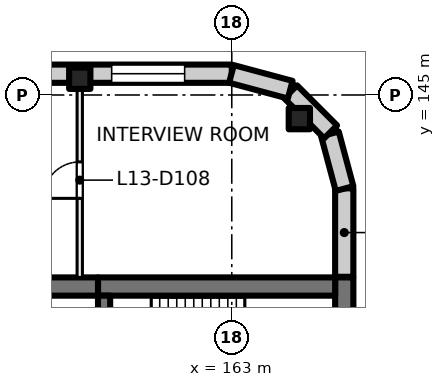
"""IFC4 building model, lengths in metres.
Left out: names, types, materials, properties, quantities, classifications, styles, units other than length and angle.
Written with IfcOpenShell. Run it as: python <this file> out.ifc"""

import sys

from ifc_helpers import new_model, si_unit, direction, frame, frame_2d, origin, origin_2d, place, context, subcontext, project, spatial, rectangle, extrude, element, fill, save


model = new_model("IFC4")
c1 = context("Model", 3, precision=1e-05, world=origin(), true_north=direction((0.0, 1.0)))
c2 = subcontext(c1, "Body", "Model", "MODEL_VIEW")
j1 = project(units=[si_unit("LENGTHUNIT", "METRE"), si_unit("PLANEANGLEUNIT", "RADIAN")], contexts=[c1])
p1 = place(None, origin())
s1 = spatial("IfcSite", under=j1, at=p1, CompositionType="ELEMENT")
p2 = place(p1, origin())
s2 = spatial("IfcBuilding", under=s1, at=p2, CompositionType="ELEMENT")
p3 = place(p2, frame((0.0, 0.0, 59.5)))
s3 = spatial("IfcBuildingStorey", under=s2, at=p3, CompositionType="ELEMENT", Elevation=59.5)
for number, where, z_axis, x_axis in (
    (1, (165.223, 144.223, 0.0), (0.0, 0.0, 1.0), (1.0, 0.0, 0.0)),
    (2, (158.0, 145.55, 0.0), (0.0, 0.0, 1.0), (1.0, 0.0, 0.0)),
):
    element("IfcColumn", number, at=place(p3, frame(where, z_axis=z_axis, x_axis=x_axis)), inside=s3, PredefinedType="COLUMN", context=c2, shape_type="SweptSolid", body=[
        extrude(rectangle(XDim=0.7, YDim=0.7, at=origin_2d()), origin(), (0.0, 0.0, 1.0), 4.0),
    ])
p4 = place(p3, frame((166.7, 139.0, 0.0), z_axis=(0.0, 0.0, 1.0), x_axis=(0.0, -1.0, 0.0)))
e3 = element("IfcWall", 3, at=p4, inside=s3, PredefinedType="SHEAR", context=c2, shape_type="SweptSolid", body=[
    extrude(rectangle(XDim=3.8, YDim=0.6, at=frame_2d((1.9, 0.0))), origin(), (0.0, 0.0, 1.0), 4.0),
])
p5 = place(p3, frame((166.4, 138.7, 0.0), z_axis=(0.0, 0.0, 1.0), x_axis=(-1.0, 0.0, 0.0)))
e4 = element("IfcWall", 4, at=p5, inside=s3, PredefinedType="SHEAR", context=c2, shape_type="SweptSolid", body=[
    extrude(rectangle(XDim=7.8, YDim=0.6, at=frame_2d((3.9, 0.0))), origin(), (0.0, 0.0, 1.0), 4.0),
])
p6 = place(p3, frame((158.6, 138.7, 0.0), z_axis=(0.0, 0.0, 1.0), x_axis=(-1.0, 0.0, 0.0)))
e5 = element("IfcWall", 5, at=p6, inside=s3, PredefinedType="SHEAR", context=c2, shape_type="SweptSolid", body=[
    extrude(rectangle(XDim=4.6, YDim=0.6, at=frame_2d((2.3, 0.0))), origin(), (0.0, 0.0, 1.0), 4.0),
])
p7 = place(p3, frame((158.8, 138.4, 0.0), z_axis=(0.0, 0.0, 1.0), x_axis=(0.0, -1.0, 0.0)))
e6 = element("IfcWall", 6, at=p7, inside=s3, PredefinedType="SHEAR", context=c2, shape_type="SweptSolid", body=[
    extrude(rectangle(XDim=2.8, YDim=0.4, at=frame_2d((1.4, 0.0))), origin(), (0.0, 0.0, 1.0), 4.0),
])
p8 = place(p7, frame((0.9, 0.0, 0.0)))
e7 = element("IfcOpeningElement", 7, at=p8, cuts=e6, PredefinedType="OPENING", context=c2, shape_type="SweptSolid", body=[
    extrude(rectangle(XDim=1.0, YDim=2.1, at=frame_2d((0.5, 1.05))), frame((0.0, 0.21, 0.0), z_axis=(0.0, -1.0, 0.0), x_axis=(1.0, 0.0, 0.0)), (0.0, 0.0, 1.0), 0.42),
])
p9 = place(p3, frame((131.07, 145.7, 0.0), z_axis=(0.0, 0.0, 1.0), x_axis=(1.0, 0.0, 0.0)))
e8 = element("IfcWall", 8, at=p9, inside=s3, PredefinedType="SOLIDWALL", context=c2, shape_type="SweptSolid", body=[
    extrude(rectangle(XDim=31.93, YDim=0.6, at=frame_2d((15.965, 0.0))), origin(), (0.0, 0.0, 1.0), 3.625),
])
p10 = place(p9, frame((0.98, 0.0, 0.9)))
e9 = element("IfcOpeningElement", 9, at=p10, cuts=e8, PredefinedType="OPENING", context=c2, shape_type="SweptSolid", body=[
    extrude(rectangle(XDim=2.4, YDim=2.4, at=frame_2d((1.2, 1.2))), frame((0.0, 0.31, 0.0), z_axis=(0.0, -1.0, 0.0), x_axis=(1.0, 0.0, 0.0)), (0.0, 0.0, 1.0), 0.62),
])
p11 = place(p9, frame((5.48, 0.0, 0.9)))
e10 = element("IfcOpeningElement", 10, at=p11, cuts=e8, PredefinedType="OPENING", context=c2, shape_type="SweptSolid", body=[
    extrude(rectangle(XDim=2.4, YDim=2.4, at=frame_2d((1.2, 1.2))), frame((0.0, 0.31, 0.0), z_axis=(0.0, -1.0, 0.0), x_axis=(1.0, 0.0, 0.0)), (0.0, 0.0, 1.0), 0.62),
])
p12 = place(p9, frame((9.98, 0.0, 0.9)))
e11 = element("IfcOpeningElement", 11, at=p12, cuts=e8, PredefinedType="OPENING", context=c2, shape_type="SweptSolid", body=[
    extrude(rectangle(XDim=2.4, YDim=2.4, at=frame_2d((1.2, 1.2))), frame((0.0, 0.31, 0.0), z_axis=(0.0, -1.0, 0.0), x_axis=(1.0, 0.0, 0.0)), (0.0, 0.0, 1.0), 0.62),
])
p13 = place(p9, frame((14.48, 0.0, 0.9)))
e12 = element("IfcOpeningElement", 12, at=p13, cuts=e8, PredefinedType="OPENING", context=c2, shape_type="SweptSolid", body=[
    extrude(rectangle(XDim=2.4, YDim=2.4, at=frame_2d((1.2, 1.2))), frame((0.0, 0.31, 0.0), z_axis=(0.0, -1.0, 0.0), x_axis=(1.0, 0.0, 0.0)), (0.0, 0.0, 1.0), 0.62),
])
p14 = place(p9, frame((18.98, 0.0, 0.9)))
e13 = element("IfcOpeningElement", 13, at=p14, cuts=e8, PredefinedType="OPENING", context=c2, shape_type="SweptSolid", body=[
    extrude(rectangle(XDim=2.4, YDim=2.4, at=frame_2d((1.2, 1.2))), frame((0.0, 0.31, 0.0), z_axis=(0.0, -1.0, 0.0), x_axis=(1.0, 0.0, 0.0)), (0.0, 0.0, 1.0), 0.62),
])
p15 = place(p9, frame((23.48, 0.0, 0.9)))
e14 = element("IfcOpeningElement", 14, at=p15, cuts=e8, PredefinedType="OPENING", context=c2, shape_type="SweptSolid", body=[
    extrude(rectangle(XDim=2.4, YDim=2.4, at=frame_2d((1.2, 1.2))), frame((0.0, 0.31, 0.0), z_axis=(0.0, -1.0, 0.0), x_axis=(1.0, 0.0, 0.0)), (0.0, 0.0, 1.0), 0.62),
])
p16 = place(p9, frame((27.98, 0.0, 0.9)))
e15 = element("IfcOpeningElement", 15, at=p16, cuts=e8, PredefinedType="OPENING", context=c2, shape_type="SweptSolid", body=[
    extrude(rectangle(XDim=2.4, YDim=2.4, at=frame_2d((1.2, 1.2))), frame((0.0, 0.31, 0.0), z_axis=(0.0, -1.0, 0.0), x_axis=(1.0, 0.0, 0.0)), (0.0, 0.0, 1.0), 0.62),
])
p17 = place(p3, frame((166.7, 141.93, 0.0), z_axis=(0.0, 0.0, 1.0), x_axis=(0.0, -1.0, 0.0)))
e16 = element("IfcWall", 16, at=p17, inside=s3, PredefinedType="SOLIDWALL", context=c2, shape_type="SweptSolid", body=[
    extrude(rectangle(XDim=2.91, YDim=0.6, at=frame_2d((1.455, 0.0))), origin(), (0.0, 0.0, 1.0), 3.625),
])
for number, where, z_axis, x_axis in (
    (17, (166.229, 143.719, 0.0), (0.0, 0.0, 1.0), (0.259, -0.966, 0.0)),
    (18, (164.936, 145.104, 0.0), (0.0, 0.0, 1.0), (0.707, -0.707, 0.0)),
):
    element("IfcWall", number, at=place(p3, frame(where, z_axis=z_axis, x_axis=x_axis)), inside=s3, PredefinedType="SOLIDWALL", context=c2, shape_type="SweptSolid", body=[
        extrude(rectangle(XDim=1.861, YDim=0.6, at=frame_2d((0.93, 0.0))), origin(), (0.0, 0.0, 1.0), 3.625),
    ])
p18 = place(p3, frame((162.99, 145.692, 0.0), z_axis=(0.0, 0.0, 1.0), x_axis=(0.965920269068, -0.258839784042, 0.0)))
e19 = element("IfcWall", 19, at=p18, inside=s3, PredefinedType="SOLIDWALL", context=c2, shape_type="SweptSolid", body=[
    extrude(rectangle(XDim=2.0, YDim=0.6, at=frame_2d((1.0, 0.0))), origin(), (0.0, 0.0, 1.0), 3.625),
])
p19 = place(p3, frame((158.0, 139.0, 0.0), z_axis=(0.0, 0.0, 1.0), x_axis=(0.0, 1.0, 0.0)))
e20 = element("IfcWall", 20, at=p19, inside=s3, PredefinedType="PARTITIONING", context=c2, shape_type="SweptSolid", body=[
    extrude(rectangle(XDim=6.4, YDim=0.175, at=frame_2d((3.2, 0.0))), origin(), (0.0, 0.0, 1.0), 3.625),
])
p20 = place(p19, frame((2.6, 0.0, 0.0)))
e21 = element("IfcOpeningElement", 21, at=p20, cuts=e20, PredefinedType="OPENING", context=c2, shape_type="SweptSolid", body=[
    extrude(rectangle(XDim=1.2, YDim=2.1, at=frame_2d((0.6, 1.05))), frame((0.0, 0.097, 0.0), z_axis=(0.0, -1.0, 0.0), x_axis=(1.0, 0.0, 0.0)), (0.0, 0.0, 1.0), 0.195),
])
p21 = place(p16, origin())
e22 = element("IfcWindow", 22, at=p21, inside=s3, PartitioningType="SINGLE_PANEL", PredefinedType="WINDOW", context=c2, shape_type="SweptSolid", body=[
    extrude(rectangle(XDim=2.4, YDim=2.4, at=frame_2d((1.2, 1.2))), frame((0.0, 0.03, 0.0), z_axis=(0.0, -1.0, 0.0), x_axis=(1.0, 0.0, 0.0)), (0.0, 0.0, 1.0), 0.06),
])
fill(e15, e22)
p22 = place(p20, origin())
e23 = element("IfcDoor", 23, at=p22, inside=s3, OperationType="DOUBLE_DOOR_SINGLE_SWING", PredefinedType="DOOR", context=c2, shape_type="SweptSolid", body=[
    extrude(rectangle(XDim=1.2, YDim=2.1, at=frame_2d((0.6, 1.05))), frame((0.0, 0.025, 0.0), z_axis=(0.0, -1.0, 0.0), x_axis=(1.0, 0.0, 0.0)), (0.0, 0.0, 1.0), 0.05),
])
fill(e21, e23)
save(model, sys.argv[1])
